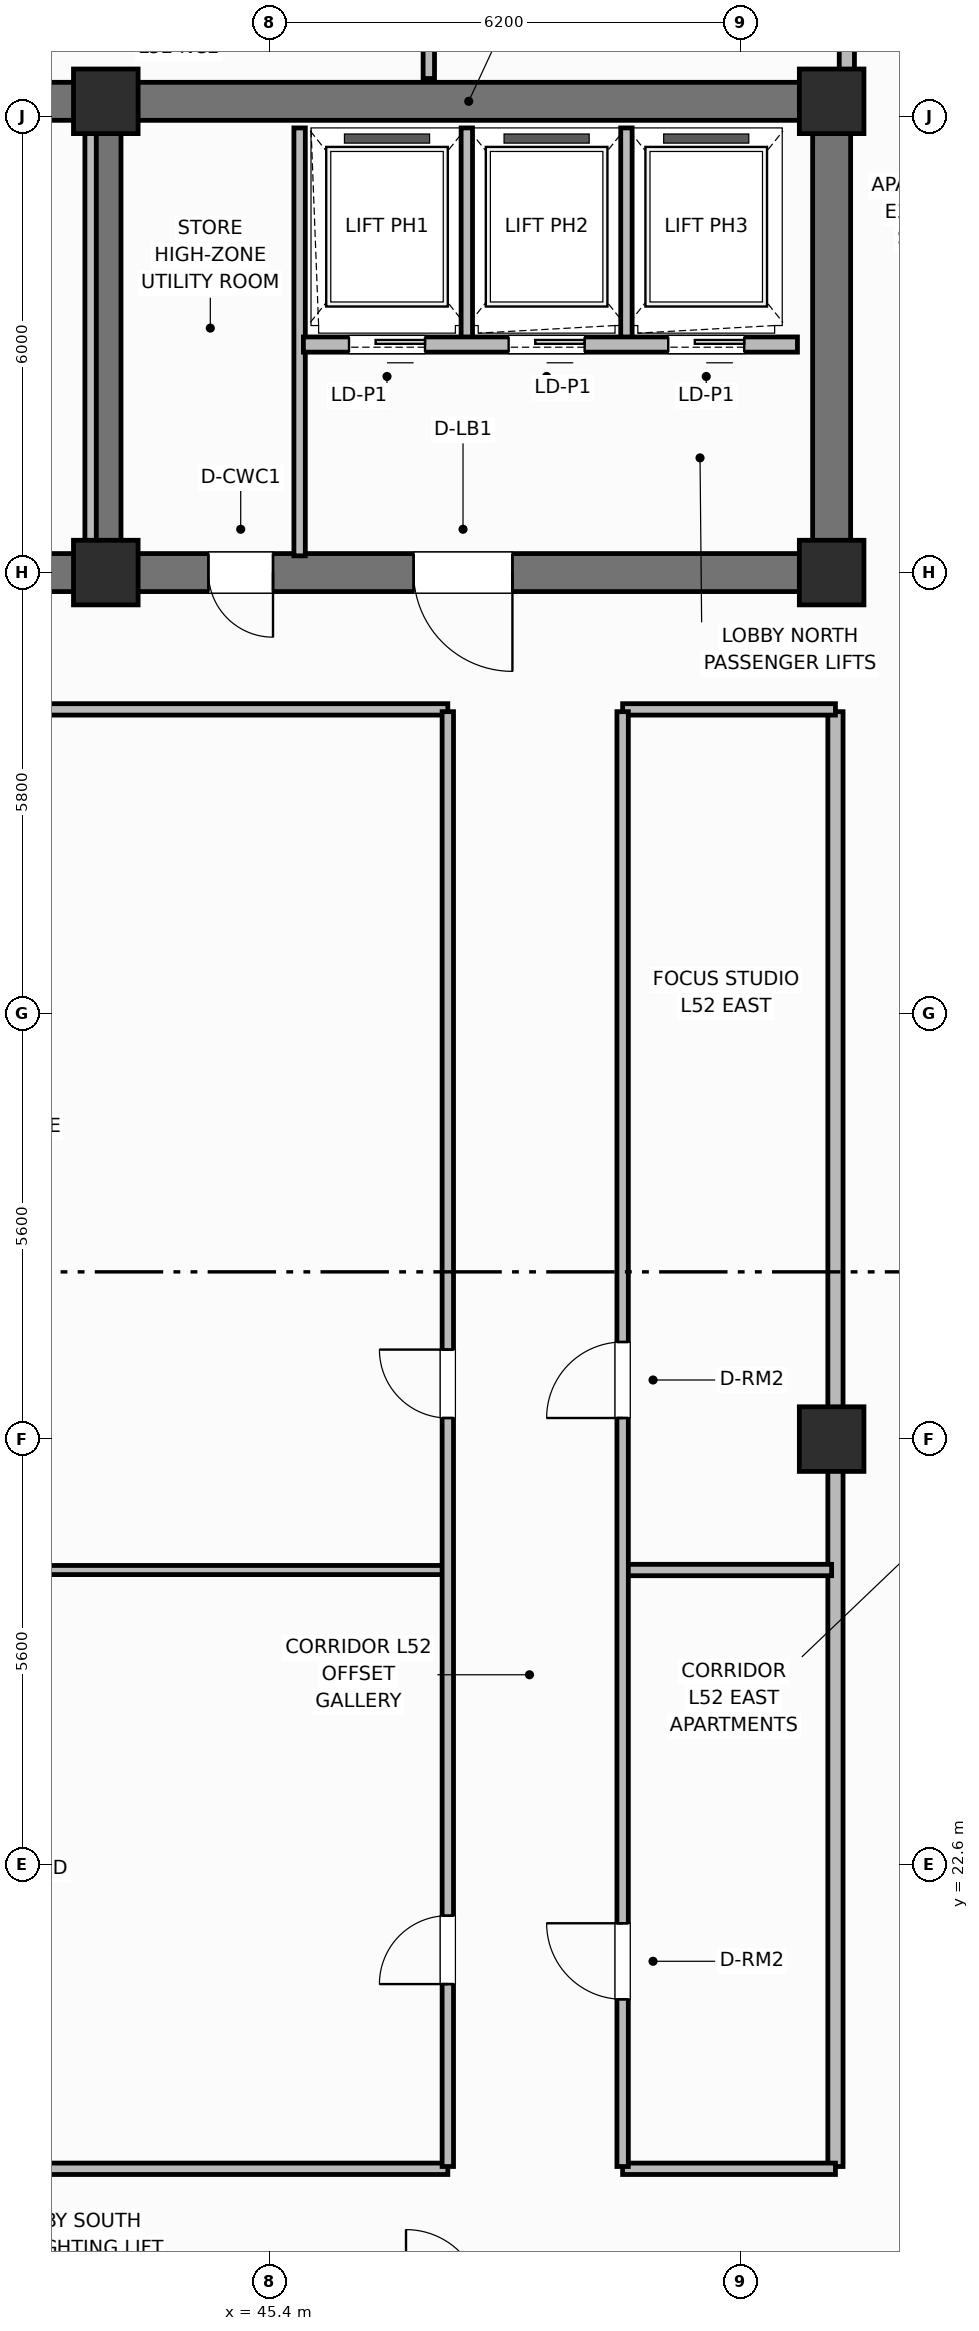
"""IFC4 building model, lengths in metres.
Left out: names, types, materials, properties, quantities, classifications, styles, units other than length and angle.
Written with IfcOpenShell. Run it as: python <this file> out.ifc"""

import sys

from ifc_helpers import new_model, si_unit, direction, frame, frame_2d, origin, origin_2d, place, context, subcontext, project, spatial, rectangle, extrude, element, fill, save


model = new_model("IFC4")
c1 = context("Model", 3, precision=1e-05, world=origin(), true_north=direction((0.0, 1.0)))
c2 = subcontext(c1, "Body", "Model", "MODEL_VIEW")
j1 = project(units=[si_unit("LENGTHUNIT", "METRE"), si_unit("PLANEANGLEUNIT", "RADIAN")], contexts=[c1])
p1 = place(None, origin())
s1 = spatial("IfcSite", under=j1, at=p1, CompositionType="ELEMENT")
p2 = place(p1, origin())
s2 = spatial("IfcBuilding", under=s1, at=p2, CompositionType="ELEMENT")
p3 = place(p2, frame((0.0, 0.0, 211.0)))
s3 = spatial("IfcBuildingStorey", under=s2, at=p3, CompositionType="ELEMENT", Elevation=211.0)
p4 = place(p3, frame((25.6, 45.8, 0.0), z_axis=(0.0, 0.0, 1.0), x_axis=(1.0, 0.0, 0.0)))
e1 = element("IfcWall", 1, at=p4, inside=s3, PredefinedType="SHEAR", context=c2, shape_type="SweptSolid", body=[
    extrude(rectangle(XDim=27.2, YDim=0.5, at=frame_2d((13.6, 0.0))), origin(), (0.0, 0.0, 1.0), 3.7),
])
p5 = place(p3, frame((52.8, 39.85, 0.0), z_axis=(0.0, 0.0, 1.0), x_axis=(0.0, 1.0, 0.0)))
e2 = element("IfcWall", 2, at=p5, inside=s3, PredefinedType="SHEAR", context=c2, shape_type="SweptSolid", body=[
    extrude(rectangle(XDim=5.7, YDim=0.5, at=frame_2d((2.85, 0.0))), origin(), (0.0, 0.0, 1.0), 3.7),
])
p6 = place(p3, frame((52.8, 39.6, 0.0), z_axis=(0.0, 0.0, 1.0), x_axis=(-1.0, 0.0, 0.0)))
e3 = element("IfcWall", 3, at=p6, inside=s3, PredefinedType="SHEAR", context=c2, shape_type="SweptSolid", body=[
    extrude(rectangle(XDim=27.2, YDim=0.5, at=frame_2d((13.6, 0.0))), origin(), (0.0, 0.0, 1.0), 3.7),
])
p7 = place(p6, frame((24.2, 0.0, 0.0)))
e4 = element("IfcOpeningElement", 4, at=p7, cuts=e3, PredefinedType="OPENING", context=c2, shape_type="SweptSolid", body=[
    extrude(rectangle(XDim=1.1, YDim=2.15, at=frame_2d((0.55, 1.075))), frame((0.0, 0.26, 0.0), z_axis=(0.0, -1.0, 0.0), x_axis=(1.0, 0.0, 0.0)), (0.0, 0.0, 1.0), 0.52),
])
p8 = place(p6, frame((15.1, 0.0, 0.0)))
e5 = element("IfcOpeningElement", 5, at=p8, cuts=e3, PredefinedType="OPENING", context=c2, shape_type="SweptSolid", body=[
    extrude(rectangle(XDim=1.2, YDim=2.15, at=frame_2d((0.6, 1.075))), frame((0.0, 0.26, 0.0), z_axis=(0.0, -1.0, 0.0), x_axis=(1.0, 0.0, 0.0)), (0.0, 0.0, 1.0), 0.52),
])
p9 = place(p6, frame((11.6, 0.0, 0.0)))
e6 = element("IfcOpeningElement", 6, at=p9, cuts=e3, PredefinedType="OPENING", context=c2, shape_type="SweptSolid", body=[
    extrude(rectangle(XDim=0.9, YDim=2.1, at=frame_2d((0.45, 1.05))), frame((0.0, 0.26, 0.0), z_axis=(0.0, -1.0, 0.0), x_axis=(1.0, 0.0, 0.0)), (0.0, 0.0, 1.0), 0.52),
])
p10 = place(p6, frame((7.35, 0.0, 0.0)))
e7 = element("IfcOpeningElement", 7, at=p10, cuts=e3, PredefinedType="OPENING", context=c2, shape_type="SweptSolid", body=[
    extrude(rectangle(XDim=0.85, YDim=2.1, at=frame_2d((0.425, 1.05))), frame((0.0, 0.26, 0.0), z_axis=(0.0, -1.0, 0.0), x_axis=(1.0, 0.0, 0.0)), (0.0, 0.0, 1.0), 0.52),
])
p11 = place(p6, frame((4.2, 0.0, 0.0)))
e8 = element("IfcOpeningElement", 8, at=p11, cuts=e3, PredefinedType="OPENING", context=c2, shape_type="SweptSolid", body=[
    extrude(rectangle(XDim=1.3, YDim=2.2, at=frame_2d((0.65, 1.1))), frame((0.0, 0.26, 0.0), z_axis=(0.0, -1.0, 0.0), x_axis=(1.0, 0.0, 0.0)), (0.0, 0.0, 1.0), 0.52),
])
p12 = place(p3, frame((43.25, 39.85, 0.0), z_axis=(0.0, 0.0, 1.0), x_axis=(0.0, 1.0, 0.0)))
e9 = element("IfcWall", 9, at=p12, inside=s3, PredefinedType="SHEAR", context=c2, shape_type="SweptSolid", body=[
    extrude(rectangle(XDim=5.7, YDim=0.4, at=frame_2d((2.85, 0.0))), origin(), (0.0, 0.0, 1.0), 3.7),
])
for number, where, z_axis, x_axis in (
    (10, (43.25, 39.6, 0.0), (0.0, 0.0, 1.0), (1.0, 0.0, 0.0)),
    (11, (43.25, 45.8, 0.0), (0.0, 0.0, 1.0), (1.0, 0.0, 0.0)),
    (12, (52.8, 39.6, 0.0), (0.0, 0.0, 1.0), (1.0, 0.0, 0.0)),
    (13, (52.8, 45.8, 0.0), (0.0, 0.0, 1.0), (1.0, 0.0, 0.0)),
    (14, (52.8, 28.2, 0.0), (0.0, 0.0, 1.0), (1.0, 0.0, 0.0)),
):
    element("IfcColumn", number, at=place(p3, frame(where, z_axis=z_axis, x_axis=x_axis)), inside=s3, PredefinedType="COLUMN", context=c2, shape_type="SweptSolid", body=[
        extrude(rectangle(XDim=0.85, YDim=0.85, at=origin_2d()), origin(), (0.0, 0.0, 1.0), 3.7),
    ])
for number, where, z_axis, x_axis in (
    (15, (43.05, 39.82, 0.0), (0.0, 0.0, 1.0), (0.0, 1.0, 0.0)),
    (16, (45.8, 39.82, 0.0), (0.0, 0.0, 1.0), (0.0, 1.0, 0.0)),
):
    element("IfcWall", number, at=place(p3, frame(where, z_axis=z_axis, x_axis=x_axis)), inside=s3, PredefinedType="PARTITIONING", context=c2, shape_type="SweptSolid", body=[
        extrude(rectangle(XDim=5.63, YDim=0.15, at=frame_2d((2.815, 0.0))), origin(), (0.0, 0.0, 1.0), 2.55),
    ])
for number, where, z_axis, x_axis in (
    (17, (48.0, 42.65, 0.0), (0.0, 0.0, 1.0), (0.0, 1.0, 0.0)),
    (18, (50.1, 42.65, 0.0), (0.0, 0.0, 1.0), (0.0, 1.0, 0.0)),
):
    element("IfcWall", number, at=place(p3, frame(where, z_axis=z_axis, x_axis=x_axis)), inside=s3, PredefinedType="PARTITIONING", context=c2, shape_type="SweptSolid", body=[
        extrude(rectangle(XDim=2.8, YDim=0.15, at=frame_2d((1.4, 0.0))), origin(), (0.0, 0.0, 1.0), 2.55),
    ])
p13 = place(p3, frame((52.35, 42.6, 0.0), z_axis=(0.0, 0.0, 1.0), x_axis=(-1.0, 0.0, 0.0)))
e19 = element("IfcWall", 19, at=p13, inside=s3, PredefinedType="PARTITIONING", context=c2, shape_type="SweptSolid", body=[
    extrude(rectangle(XDim=6.5, YDim=0.2, at=frame_2d((3.25, 0.0))), origin(), (0.0, 0.0, 1.0), 2.55),
])
p14 = place(p13, frame((4.9, 0.0, 0.0)))
e20 = element("IfcOpeningElement", 20, at=p14, cuts=e19, PredefinedType="OPENING", context=c2, shape_type="SweptSolid", body=[
    extrude(rectangle(XDim=1.0, YDim=2.15, at=frame_2d((0.5, 1.075))), frame((0.0, 0.11, 0.0), z_axis=(0.0, -1.0, 0.0), x_axis=(1.0, 0.0, 0.0)), (0.0, 0.0, 1.0), 0.22),
])
p15 = place(p13, frame((2.8, 0.0, 0.0)))
e21 = element("IfcOpeningElement", 21, at=p15, cuts=e19, PredefinedType="OPENING", context=c2, shape_type="SweptSolid", body=[
    extrude(rectangle(XDim=1.0, YDim=2.15, at=frame_2d((0.5, 1.075))), frame((0.0, 0.11, 0.0), z_axis=(0.0, -1.0, 0.0), x_axis=(1.0, 0.0, 0.0)), (0.0, 0.0, 1.0), 0.22),
])
p16 = place(p13, frame((0.7, 0.0, 0.0)))
e22 = element("IfcOpeningElement", 22, at=p16, cuts=e19, PredefinedType="OPENING", context=c2, shape_type="SweptSolid", body=[
    extrude(rectangle(XDim=1.0, YDim=2.15, at=frame_2d((0.5, 1.075))), frame((0.0, 0.11, 0.0), z_axis=(0.0, -1.0, 0.0), x_axis=(1.0, 0.0, 0.0)), (0.0, 0.0, 1.0), 0.22),
])
p17 = place(p3, frame((52.85, 18.63, 0.0), z_axis=(0.0, 0.0, 1.0), x_axis=(0.0, 1.0, 0.0)))
e23 = element("IfcWall", 23, at=p17, inside=s3, PredefinedType="PARTITIONING", context=c2, shape_type="SweptSolid", body=[
    extrude(rectangle(XDim=19.14, YDim=0.2, at=frame_2d((9.57, 0.0))), origin(), (0.0, 0.0, 1.0), 2.55),
])
p18 = place(p3, frame((25.55, 18.6, 0.0), z_axis=(0.0, 0.0, 1.0), x_axis=(1.0, 0.0, 0.0)))
e24 = element("IfcWall", 24, at=p18, inside=s3, PredefinedType="PARTITIONING", context=c2, shape_type="SweptSolid", body=[
    extrude(rectangle(XDim=22.2, YDim=0.15, at=frame_2d((11.1, 0.0))), origin(), (0.0, 0.0, 1.0), 2.55),
])
p19 = place(p3, frame((50.05, 18.6, 0.0), z_axis=(0.0, 0.0, 1.0), x_axis=(1.0, 0.0, 0.0)))
e25 = element("IfcWall", 25, at=p19, inside=s3, PredefinedType="PARTITIONING", context=c2, shape_type="SweptSolid", body=[
    extrude(rectangle(XDim=2.8, YDim=0.15, at=frame_2d((1.4, 0.0))), origin(), (0.0, 0.0, 1.0), 2.55),
])
p20 = place(p3, frame((25.55, 37.8, 0.0), z_axis=(0.0, 0.0, 1.0), x_axis=(1.0, 0.0, 0.0)))
e26 = element("IfcWall", 26, at=p20, inside=s3, PredefinedType="PARTITIONING", context=c2, shape_type="SweptSolid", body=[
    extrude(rectangle(XDim=22.2, YDim=0.15, at=frame_2d((11.1, 0.0))), origin(), (0.0, 0.0, 1.0), 2.55),
])
p21 = place(p3, frame((50.05, 37.8, 0.0), z_axis=(0.0, 0.0, 1.0), x_axis=(1.0, 0.0, 0.0)))
e27 = element("IfcWall", 27, at=p21, inside=s3, PredefinedType="PARTITIONING", context=c2, shape_type="SweptSolid", body=[
    extrude(rectangle(XDim=2.8, YDim=0.15, at=frame_2d((1.4, 0.0))), origin(), (0.0, 0.0, 1.0), 2.55),
])
p22 = place(p3, frame((34.95, 26.477, 0.0), z_axis=(0.0, 0.0, 1.0), x_axis=(1.0, 0.0, 0.0)))
e28 = element("IfcWall", 28, at=p22, inside=s3, PredefinedType="PARTITIONING", context=c2, shape_type="SweptSolid", body=[
    extrude(rectangle(XDim=12.81, YDim=0.12, at=frame_2d((6.405, 0.0))), origin(), (0.0, 0.0, 1.0), 2.55),
])
p23 = place(p3, frame((50.08, 26.477, 0.0), z_axis=(0.0, 0.0, 1.0), x_axis=(1.0, 0.0, 0.0)))
e29 = element("IfcWall", 29, at=p23, inside=s3, PredefinedType="PARTITIONING", context=c2, shape_type="SweptSolid", body=[
    extrude(rectangle(XDim=2.72, YDim=0.15, at=frame_2d((1.36, 0.0))), origin(), (0.0, 0.0, 1.0), 2.55),
])
p24 = place(p3, frame((47.75, 18.63, 0.0), z_axis=(0.0, 0.0, 1.0), x_axis=(0.0, 1.0, 0.0)))
e30 = element("IfcWall", 30, at=p24, inside=s3, PredefinedType="PARTITIONING", context=c2, shape_type="SweptSolid", body=[
    extrude(rectangle(XDim=19.14, YDim=0.15, at=frame_2d((9.57, 0.0))), origin(), (0.0, 0.0, 1.0), 2.55),
])
p25 = place(p24, frame((2.4, 0.0, 0.0)))
e31 = element("IfcOpeningElement", 31, at=p25, cuts=e30, PredefinedType="OPENING", context=c2, shape_type="SweptSolid", body=[
    extrude(rectangle(XDim=0.9, YDim=2.1, at=frame_2d((0.45, 1.05))), frame((0.0, 0.085, 0.0), z_axis=(0.0, -1.0, 0.0), x_axis=(1.0, 0.0, 0.0)), (0.0, 0.0, 1.0), 0.17),
])
p26 = place(p24, frame((9.847, 0.0, 0.0)))
e32 = element("IfcOpeningElement", 32, at=p26, cuts=e30, PredefinedType="OPENING", context=c2, shape_type="SweptSolid", body=[
    extrude(rectangle(XDim=0.9, YDim=2.1, at=frame_2d((0.45, 1.05))), frame((0.0, 0.085, 0.0), z_axis=(0.0, -1.0, 0.0), x_axis=(1.0, 0.0, 0.0)), (0.0, 0.0, 1.0), 0.17),
])
p27 = place(p3, frame((50.05, 18.63, 0.0), z_axis=(0.0, 0.0, 1.0), x_axis=(0.0, 1.0, 0.0)))
e33 = element("IfcWall", 33, at=p27, inside=s3, PredefinedType="PARTITIONING", context=c2, shape_type="SweptSolid", body=[
    extrude(rectangle(XDim=19.14, YDim=0.15, at=frame_2d((9.57, 0.0))), origin(), (0.0, 0.0, 1.0), 2.55),
])
p28 = place(p27, frame((2.2, 0.0, 0.0)))
e34 = element("IfcOpeningElement", 34, at=p28, cuts=e33, PredefinedType="OPENING", context=c2, shape_type="SweptSolid", body=[
    extrude(rectangle(XDim=1.0, YDim=2.15, at=frame_2d((0.5, 1.075))), frame((0.0, 0.085, 0.0), z_axis=(0.0, -1.0, 0.0), x_axis=(1.0, 0.0, 0.0)), (0.0, 0.0, 1.0), 0.17),
])
p29 = place(p27, frame((9.847, 0.0, 0.0)))
e35 = element("IfcOpeningElement", 35, at=p29, cuts=e33, PredefinedType="OPENING", context=c2, shape_type="SweptSolid", body=[
    extrude(rectangle(XDim=1.0, YDim=2.15, at=frame_2d((0.5, 1.075))), frame((0.0, 0.085, 0.0), z_axis=(0.0, -1.0, 0.0), x_axis=(1.0, 0.0, 0.0)), (0.0, 0.0, 1.0), 0.17),
])
p30 = place(p3, frame((47.5, 46.1, 0.0), z_axis=(0.0, 0.0, 1.0), x_axis=(0.0, 1.0, 0.0)))
e36 = element("IfcWall", 36, at=p30, inside=s3, PredefinedType="PARTITIONING", context=c2, shape_type="SweptSolid", body=[
    extrude(rectangle(XDim=3.43, YDim=0.15, at=frame_2d((1.715, 0.0))), origin(), (0.0, 0.0, 1.0), 2.55),
])
p31 = place(p30, frame((0.85, 0.0, 0.0)))
e37 = element("IfcOpeningElement", 37, at=p31, cuts=e36, PredefinedType="OPENING", context=c2, shape_type="SweptSolid", body=[
    extrude(rectangle(XDim=0.9, YDim=2.1, at=frame_2d((0.45, 1.05))), frame((0.0, 0.085, 0.0), z_axis=(0.0, -1.0, 0.0), x_axis=(1.0, 0.0, 0.0)), (0.0, 0.0, 1.0), 0.17),
])
p32 = place(p3, frame((53.0, 46.1, 0.0), z_axis=(0.0, 0.0, 1.0), x_axis=(0.0, 1.0, 0.0)))
e38 = element("IfcWall", 38, at=p32, inside=s3, PredefinedType="PARTITIONING", context=c2, shape_type="SweptSolid", body=[
    extrude(rectangle(XDim=2.73, YDim=0.2, at=frame_2d((1.365, 0.0))), origin(), (0.0, 0.0, 1.0), 2.55),
])
p33 = place(p32, frame((0.65, 0.0, 0.0)))
e39 = element("IfcOpeningElement", 39, at=p33, cuts=e38, PredefinedType="OPENING", context=c2, shape_type="SweptSolid", body=[
    extrude(rectangle(XDim=0.9, YDim=2.1, at=frame_2d((0.45, 1.05))), frame((0.0, 0.11, 0.0), z_axis=(0.0, -1.0, 0.0), x_axis=(1.0, 0.0, 0.0)), (0.0, 0.0, 1.0), 0.22),
])
p34 = place(p14, origin())
e40 = element("IfcDoor", 40, at=p34, inside=s3, OperationType="SLIDING_TO_LEFT", PredefinedType="DOOR", context=c2, shape_type="SweptSolid", body=[
    extrude(rectangle(XDim=1.0, YDim=2.15, at=frame_2d((0.5, 1.075))), frame((0.0, 0.025, 0.0), z_axis=(0.0, -1.0, 0.0), x_axis=(1.0, 0.0, 0.0)), (0.0, 0.0, 1.0), 0.05),
])
fill(e20, e40)
p35 = place(p15, origin())
e41 = element("IfcDoor", 41, at=p35, inside=s3, OperationType="SLIDING_TO_LEFT", PredefinedType="DOOR", context=c2, shape_type="SweptSolid", body=[
    extrude(rectangle(XDim=1.0, YDim=2.15, at=frame_2d((0.5, 1.075))), frame((0.0, 0.025, 0.0), z_axis=(0.0, -1.0, 0.0), x_axis=(1.0, 0.0, 0.0)), (0.0, 0.0, 1.0), 0.05),
])
fill(e21, e41)
p36 = place(p16, origin())
e42 = element("IfcDoor", 42, at=p36, inside=s3, OperationType="SLIDING_TO_LEFT", PredefinedType="DOOR", context=c2, shape_type="SweptSolid", body=[
    extrude(rectangle(XDim=1.0, YDim=2.15, at=frame_2d((0.5, 1.075))), frame((0.0, 0.025, 0.0), z_axis=(0.0, -1.0, 0.0), x_axis=(1.0, 0.0, 0.0)), (0.0, 0.0, 1.0), 0.05),
])
fill(e22, e42)
p37 = place(p25, origin())
e43 = element("IfcDoor", 43, at=p37, inside=s3, OperationType="SINGLE_SWING_LEFT", PredefinedType="DOOR", context=c2, shape_type="SweptSolid", body=[
    extrude(rectangle(XDim=0.9, YDim=2.1, at=frame_2d((0.45, 1.05))), frame((0.0, 0.025, 0.0), z_axis=(0.0, -1.0, 0.0), x_axis=(1.0, 0.0, 0.0)), (0.0, 0.0, 1.0), 0.05),
])
fill(e31, e43)
p38 = place(p26, origin())
e44 = element("IfcDoor", 44, at=p38, inside=s3, OperationType="SINGLE_SWING_RIGHT", PredefinedType="DOOR", context=c2, shape_type="SweptSolid", body=[
    extrude(rectangle(XDim=0.9, YDim=2.1, at=frame_2d((0.45, 1.05))), frame((0.0, 0.025, 0.0), z_axis=(0.0, -1.0, 0.0), x_axis=(1.0, 0.0, 0.0)), (0.0, 0.0, 1.0), 0.05),
])
fill(e32, e44)
p39 = place(p28, origin())
e45 = element("IfcDoor", 45, at=p39, inside=s3, OperationType="SINGLE_SWING_RIGHT", PredefinedType="DOOR", context=c2, shape_type="SweptSolid", body=[
    extrude(rectangle(XDim=1.0, YDim=2.15, at=frame_2d((0.5, 1.075))), frame((0.0, 0.025, 0.0), z_axis=(0.0, -1.0, 0.0), x_axis=(1.0, 0.0, 0.0)), (0.0, 0.0, 1.0), 0.05),
])
fill(e34, e45)
p40 = place(p29, origin())
e46 = element("IfcDoor", 46, at=p40, inside=s3, OperationType="SINGLE_SWING_LEFT", PredefinedType="DOOR", context=c2, shape_type="SweptSolid", body=[
    extrude(rectangle(XDim=1.0, YDim=2.15, at=frame_2d((0.5, 1.075))), frame((0.0, 0.025, 0.0), z_axis=(0.0, -1.0, 0.0), x_axis=(1.0, 0.0, 0.0)), (0.0, 0.0, 1.0), 0.05),
])
fill(e35, e46)
p41 = place(p10, origin())
e47 = element("IfcDoor", 47, at=p41, inside=s3, OperationType="SINGLE_SWING_LEFT", PredefinedType="DOOR", context=c2, shape_type="SweptSolid", body=[
    extrude(rectangle(XDim=0.85, YDim=2.1, at=frame_2d((0.425, 1.05))), frame((0.0, 0.025, 0.0), z_axis=(0.0, -1.0, 0.0), x_axis=(1.0, 0.0, 0.0)), (0.0, 0.0, 1.0), 0.05),
])
fill(e7, e47)
p42 = place(p11, origin())
e48 = element("IfcDoor", 48, at=p42, inside=s3, OperationType="SINGLE_SWING_LEFT", PredefinedType="DOOR", context=c2, shape_type="SweptSolid", body=[
    extrude(rectangle(XDim=1.3, YDim=2.2, at=frame_2d((0.65, 1.1))), frame((0.0, 0.025, 0.0), z_axis=(0.0, -1.0, 0.0), x_axis=(1.0, 0.0, 0.0)), (0.0, 0.0, 1.0), 0.05),
])
fill(e8, e48)
save(model, sys.argv[1])
